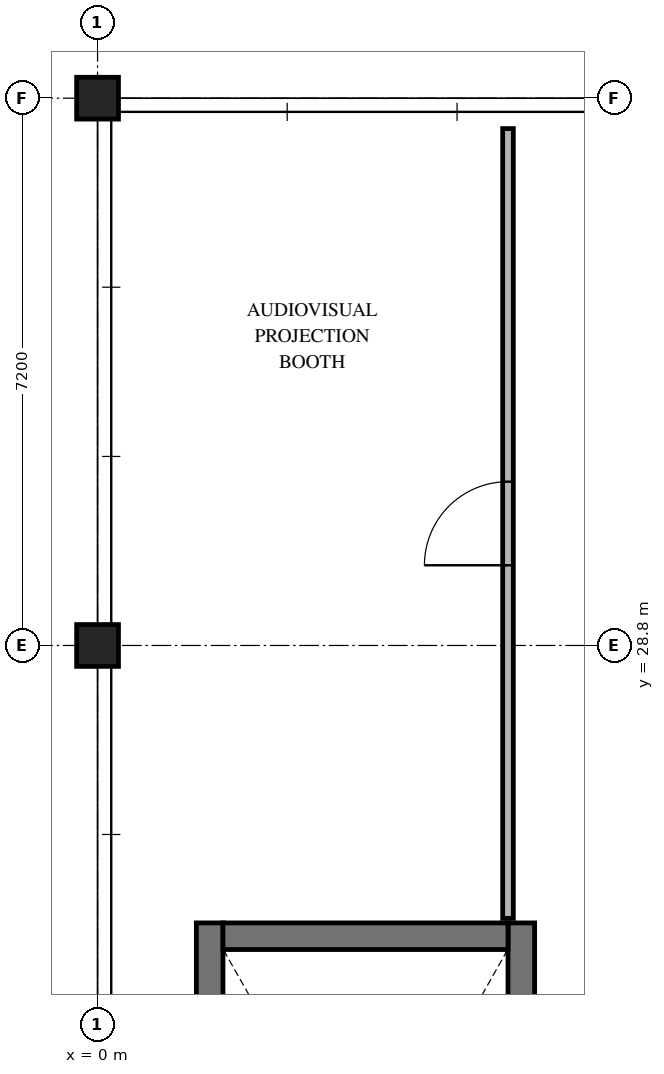
"""IFC4 building model, lengths in metres.
Left out: names, types, materials, properties, quantities, classifications, styles, units other than length and angle.
Written with IfcOpenShell. Run it as: python <this file> out.ifc"""

import sys

from ifc_helpers import new_model, si_unit, direction, frame, frame_2d, origin, origin_2d, place, context, subcontext, project, spatial, rectangle, extrude, element, fill, save


model = new_model("IFC4")
c1 = context("Model", 3, precision=1e-05, world=origin(), true_north=direction((0.0, 1.0)))
c2 = subcontext(c1, "Body", "Model", "MODEL_VIEW")
j1 = project(units=[si_unit("LENGTHUNIT", "METRE"), si_unit("PLANEANGLEUNIT", "RADIAN")], contexts=[c1])
p1 = place(None, origin())
s1 = spatial("IfcSite", under=j1, at=p1, CompositionType="ELEMENT")
p2 = place(p1, origin())
s2 = spatial("IfcBuilding", under=s1, at=p2, CompositionType="ELEMENT")
p3 = place(p2, frame((0.0, 0.0, 8.7)))
s3 = spatial("IfcBuildingStorey", under=s2, at=p3, CompositionType="ELEMENT", Elevation=8.7)
for number, where, z_axis, x_axis in (
    (1, (0.0, 28.8, 0.0), (0.0, 0.0, 1.0), (1.0, 0.0, 0.0)),
    (2, (0.0, 36.0, 0.0), (0.0, 0.0, 1.0), (1.0, 0.0, 0.0)),
):
    element("IfcColumn", number, at=place(p3, frame(where, z_axis=z_axis, x_axis=x_axis)), inside=s3, PredefinedType="COLUMN", context=c2, shape_type="SweptSolid", body=[
        extrude(rectangle(XDim=0.55, YDim=0.55, at=origin_2d()), origin(), (0.0, 0.0, 1.0), 4.2),
    ])
for number, where, z_axis, x_axis in (
    (3, (5.575, 16.05, 0.0), (0.0, 0.0, 1.0), (0.0, 1.0, 0.0)),
    (4, (1.475, 25.15, 0.0), (0.0, 0.0, 1.0), (0.0, -1.0, 0.0)),
):
    element("IfcWall", number, at=place(p3, frame(where, z_axis=z_axis, x_axis=x_axis)), inside=s3, PredefinedType="SHEAR", context=c2, shape_type="SweptSolid", body=[
        extrude(rectangle(XDim=9.1, YDim=0.35, at=frame_2d((4.55, 0.0))), origin(), (0.0, 0.0, 1.0), 3.96),
    ])
p4 = place(p3, frame((5.4, 24.975, 0.0), z_axis=(0.0, 0.0, 1.0), x_axis=(-1.0, 0.0, 0.0)))
e5 = element("IfcWall", 5, at=p4, inside=s3, PredefinedType="SHEAR", context=c2, shape_type="SweptSolid", body=[
    extrude(rectangle(XDim=3.75, YDim=0.35, at=frame_2d((1.875, 0.0))), origin(), (0.0, 0.0, 1.0), 3.96),
])
p5 = place(p3, frame((5.4, 25.21, 0.0), z_axis=(0.0, 0.0, 1.0), x_axis=(0.0, 1.0, 0.0)))
e6 = element("IfcWall", 6, at=p5, inside=s3, PredefinedType="PARTITIONING", context=c2, shape_type="SweptSolid", body=[
    extrude(rectangle(XDim=10.39, YDim=0.14, at=frame_2d((5.195, 0.0))), origin(), (0.0, 0.0, 1.0), 3.16),
])
p6 = place(p5, frame((4.645, 0.0, 0.0)))
e7 = element("IfcOpeningElement", 7, at=p6, cuts=e6, PredefinedType="OPENING", context=c2, shape_type="SweptSolid", body=[
    extrude(rectangle(XDim=1.1, YDim=2.15, at=frame_2d((0.55, 1.075))), frame((0.0, 0.08, 0.0), z_axis=(0.0, -1.0, 0.0), x_axis=(1.0, 0.0, 0.0)), (0.0, 0.0, 1.0), 0.16),
])
p7 = place(p6, origin())
e8 = element("IfcDoor", 8, at=p7, inside=s3, OperationType="SINGLE_SWING_LEFT", PredefinedType="DOOR", context=c2, shape_type="SweptSolid", body=[
    extrude(rectangle(XDim=1.1, YDim=2.15, at=frame_2d((0.55, 1.075))), frame((0.0, 0.025, 0.0), z_axis=(0.0, -1.0, 0.0), x_axis=(1.0, 0.0, 0.0)), (0.0, 0.0, 1.0), 0.05),
])
fill(e7, e8)
save(model, sys.argv[1])
